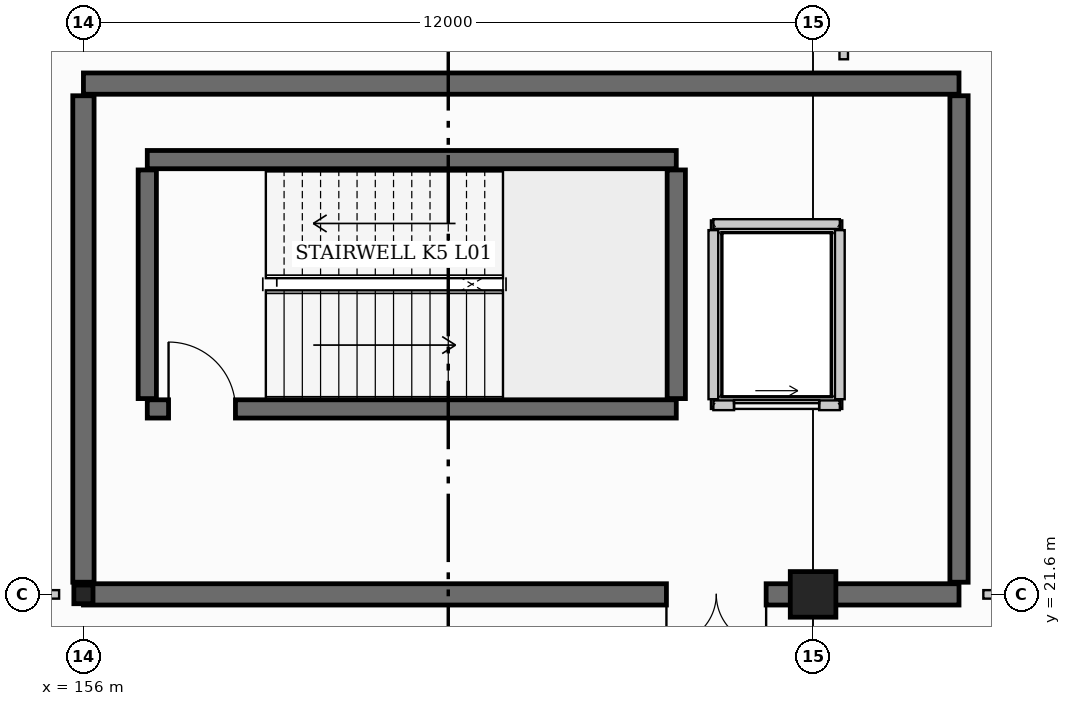
"""IFC4 building model, lengths in metres.
Left out: names, types, materials, properties, quantities, classifications, styles, units other than length and angle.
Written with IfcOpenShell. Run it as: python <this file> out.ifc"""

import sys

from ifc_helpers import new_model, si_unit, direction, frame, frame_2d, origin, origin_2d, place, context, subcontext, project, spatial, rectangle, i_section, extrude, element, fill, save


model = new_model("IFC4")
c1 = context("Model", 3, precision=1e-05, world=origin(), true_north=direction((0.0, 1.0)))
c2 = subcontext(c1, "Body", "Model", "MODEL_VIEW")
j1 = project(units=[si_unit("LENGTHUNIT", "METRE"), si_unit("PLANEANGLEUNIT", "RADIAN")], contexts=[c1])
p1 = place(None, origin())
s1 = spatial("IfcSite", under=j1, at=p1, CompositionType="ELEMENT")
p2 = place(p1, origin())
s2 = spatial("IfcBuilding", under=s1, at=p2, CompositionType="ELEMENT")
p3 = place(p2, frame((0.0, 0.0, 4.8)))
s3 = spatial("IfcBuildingStorey", under=s2, at=p3, CompositionType="ELEMENT", Elevation=4.8)
p4 = place(p3, frame((156.0, 21.6, 0.0), z_axis=(0.0, 0.0, 1.0), x_axis=(0.0, 1.0, 0.0)))
e1 = element("IfcColumn", 1, at=p4, inside=s3, PredefinedType="COLUMN", context=c2, shape_type="SweptSolid", body=[
    extrude(i_section(OverallWidth=0.307, OverallDepth=0.315, WebThickness=0.012, FlangeThickness=0.019, at=origin_2d()), origin(), (0.0, 0.0, 1.0), 4.8),
])
p5 = place(p3, frame((168.0, 21.6, 0.0), z_axis=(0.0, 0.0, 1.0), x_axis=(1.0, 0.0, 0.0)))
e2 = element("IfcColumn", 2, at=p5, inside=s3, PredefinedType="COLUMN", context=c2, shape_type="SweptSolid", body=[
    extrude(rectangle(XDim=0.75, YDim=0.75, at=origin_2d()), origin(), (0.0, 0.0, 1.0), 4.8),
])
p6 = place(p3, frame((156.0, 30.0, 0.0), z_axis=(0.0, 0.0, 1.0), x_axis=(1.0, 0.0, 0.0)))
e3 = element("IfcWall", 3, at=p6, inside=s3, PredefinedType="SHEAR", context=c2, shape_type="SweptSolid", body=[
    extrude(rectangle(XDim=14.4, YDim=0.35, at=frame_2d((7.2, 0.0))), origin(), (0.0, 0.0, 1.0), 4.8),
])
p7 = place(p3, frame((170.4, 21.6, 0.0), z_axis=(0.0, 0.0, 1.0), x_axis=(-1.0, 0.0, 0.0)))
e4 = element("IfcWall", 4, at=p7, inside=s3, PredefinedType="SHEAR", context=c2, shape_type="SweptSolid", body=[
    extrude(rectangle(XDim=14.4, YDim=0.35, at=frame_2d((7.2, 0.0))), origin(), (0.0, 0.0, 1.0), 4.8),
])
p8 = place(p7, frame((3.172, 0.0, 0.0)))
e5 = element("IfcOpeningElement", 5, at=p8, cuts=e4, PredefinedType="OPENING", context=c2, shape_type="SweptSolid", body=[
    extrude(rectangle(XDim=1.64, YDim=2.2, at=frame_2d((0.82, 1.1))), frame((0.0, 0.185, 0.0), z_axis=(0.0, -1.0, 0.0), x_axis=(1.0, 0.0, 0.0)), (0.0, 0.0, 1.0), 0.37),
])
p9 = place(p3, frame((156.0, 21.8, 0.0), z_axis=(0.0, 0.0, 1.0), x_axis=(0.0, 1.0, 0.0)))
e6 = element("IfcWall", 6, at=p9, inside=s3, PredefinedType="SHEAR", context=c2, shape_type="SweptSolid", body=[
    extrude(rectangle(XDim=8.0, YDim=0.35, at=frame_2d((4.0, 0.0))), origin(), (0.0, 0.0, 1.0), 4.8),
])
p10 = place(p3, frame((170.4, 29.8, 0.0), z_axis=(0.0, 0.0, 1.0), x_axis=(0.0, -1.0, 0.0)))
e7 = element("IfcWall", 7, at=p10, inside=s3, PredefinedType="SHEAR", context=c2, shape_type="SweptSolid", body=[
    extrude(rectangle(XDim=8.0, YDim=0.3, at=frame_2d((4.0, 0.0))), origin(), (0.0, 0.0, 1.0), 4.8),
])
p11 = place(p3, frame((157.05, 24.65, 0.0), z_axis=(0.0, 0.0, 1.0), x_axis=(1.0, 0.0, 0.0)))
e8 = element("IfcWall", 8, at=p11, inside=s3, PredefinedType="SHEAR", context=c2, shape_type="SweptSolid", body=[
    extrude(rectangle(XDim=8.7, YDim=0.3, at=frame_2d((4.35, 0.0))), origin(), (0.0, 0.0, 1.0), 4.8),
])
p12 = place(p11, frame((0.35, 0.0, 0.0)))
e9 = element("IfcOpeningElement", 9, at=p12, cuts=e8, PredefinedType="OPENING", context=c2, shape_type="SweptSolid", body=[
    extrude(rectangle(XDim=1.1, YDim=2.15, at=frame_2d((0.55, 1.075))), frame((0.0, 0.16, 0.0), z_axis=(0.0, -1.0, 0.0), x_axis=(1.0, 0.0, 0.0)), (0.0, 0.0, 1.0), 0.32),
])
p13 = place(p3, frame((165.75, 28.75, 0.0), z_axis=(0.0, 0.0, 1.0), x_axis=(-1.0, 0.0, 0.0)))
e10 = element("IfcWall", 10, at=p13, inside=s3, PredefinedType="SHEAR", context=c2, shape_type="SweptSolid", body=[
    extrude(rectangle(XDim=8.7, YDim=0.3, at=frame_2d((4.35, 0.0))), origin(), (0.0, 0.0, 1.0), 4.8),
])
for number, where, z_axis, x_axis in (
    (11, (157.05, 24.82, 0.0), (0.0, 0.0, 1.0), (0.0, 1.0, 0.0)),
    (12, (165.75, 24.82, 0.0), (0.0, 0.0, 1.0), (0.0, 1.0, 0.0)),
):
    element("IfcWall", number, at=place(p3, frame(where, z_axis=z_axis, x_axis=x_axis)), inside=s3, PredefinedType="SHEAR", context=c2, shape_type="SweptSolid", body=[
        extrude(rectangle(XDim=3.76, YDim=0.3, at=frame_2d((1.88, 0.0))), origin(), (0.0, 0.0, 1.0), 4.8),
    ])
p14 = place(p3, frame((166.36, 24.71, 0.0), z_axis=(0.0, 0.0, 1.0), x_axis=(1.0, 0.0, 0.0)))
e13 = element("IfcWall", 13, at=p14, inside=s3, PredefinedType="PARTITIONING", context=c2, shape_type="SweptSolid", body=[
    extrude(rectangle(XDim=2.08, YDim=0.16, at=frame_2d((1.04, 0.0))), origin(), (0.0, 0.0, 1.0), 4.43),
])
p15 = place(p14, frame((0.34, 0.0, 0.0)))
e14 = element("IfcOpeningElement", 14, at=p15, cuts=e13, PredefinedType="OPENING", context=c2, shape_type="SweptSolid", body=[
    extrude(rectangle(XDim=1.4, YDim=2.2, at=frame_2d((0.7, 1.1))), frame((0.0, 0.09, 0.0), z_axis=(0.0, -1.0, 0.0), x_axis=(1.0, 0.0, 0.0)), (0.0, 0.0, 1.0), 0.18),
])
p16 = place(p3, frame((168.44, 27.69, 0.0), z_axis=(0.0, 0.0, 1.0), x_axis=(-1.0, 0.0, 0.0)))
e15 = element("IfcWall", 15, at=p16, inside=s3, PredefinedType="PARTITIONING", context=c2, shape_type="SweptSolid", body=[
    extrude(rectangle(XDim=2.08, YDim=0.16, at=frame_2d((1.04, 0.0))), origin(), (0.0, 0.0, 1.0), 4.43),
])
for number, where, z_axis, x_axis in (
    (16, (166.36, 27.59, 0.0), (0.0, 0.0, 1.0), (0.0, -1.0, 0.0)),
    (17, (168.44, 24.81, 0.0), (0.0, 0.0, 1.0), (0.0, 1.0, 0.0)),
):
    element("IfcWall", number, at=place(p3, frame(where, z_axis=z_axis, x_axis=x_axis)), inside=s3, PredefinedType="PARTITIONING", context=c2, shape_type="SweptSolid", body=[
        extrude(rectangle(XDim=2.78, YDim=0.16, at=frame_2d((1.39, 0.0))), origin(), (0.0, 0.0, 1.0), 4.43),
    ])
p17 = place(p3, frame((144.3, 21.6, 0.0), z_axis=(0.0, 0.0, 1.0), x_axis=(1.0, 0.0, 0.0)))
e18 = element("IfcWall", 18, at=p17, inside=s3, PredefinedType="PARTITIONING", context=c2, shape_type="SweptSolid", body=[
    extrude(rectangle(XDim=11.3, YDim=0.14, at=frame_2d((5.65, 0.0))), origin(), (0.0, 0.0, 1.0), 3.53),
])
p18 = place(p17, frame((5.0, 0.0, 0.0)))
e19 = element("IfcOpeningElement", 19, at=p18, cuts=e18, PredefinedType="OPENING", context=c2, shape_type="SweptSolid", body=[
    extrude(rectangle(XDim=1.26, YDim=2.14, at=frame_2d((0.63, 1.07))), frame((0.0, 0.08, 0.0), z_axis=(0.0, -1.0, 0.0), x_axis=(1.0, 0.0, 0.0)), (0.0, 0.0, 1.0), 0.16),
])
p19 = place(p3, frame((168.504, 30.4, 0.0), z_axis=(0.0, 0.0, 1.0), x_axis=(0.0, 1.0, 0.0)))
e20 = element("IfcWall", 20, at=p19, inside=s3, PredefinedType="PARTITIONING", context=c2, shape_type="SweptSolid", body=[
    extrude(rectangle(XDim=14.9, YDim=0.14, at=frame_2d((7.45, 0.0))), origin(), (0.0, 0.0, 1.0), 3.823),
])
p20 = place(p3, frame((170.8, 21.6, 0.0), z_axis=(0.0, 0.0, 1.0), x_axis=(1.0, 0.0, 0.0)))
e21 = element("IfcWall", 21, at=p20, inside=s3, PredefinedType="PARTITIONING", context=c2, shape_type="SweptSolid", body=[
    extrude(rectangle(XDim=14.849, YDim=0.14, at=frame_2d((7.424, 0.0))), origin(), (0.0, 0.0, 1.0), 3.818),
])
p21 = place(p20, frame((6.774, 0.0, 0.0)))
e22 = element("IfcOpeningElement", 22, at=p21, cuts=e21, PredefinedType="OPENING", context=c2, shape_type="SweptSolid", body=[
    extrude(rectangle(XDim=1.2, YDim=2.12, at=frame_2d((0.6, 1.06))), frame((0.0, 0.08, 0.0), z_axis=(0.0, -1.0, 0.0), x_axis=(1.0, 0.0, 0.0)), (0.0, 0.0, 1.0), 0.16),
])
p22 = place(p15, origin())
e23 = element("IfcDoor", 23, at=p22, inside=s3, OperationType="SLIDING_TO_RIGHT", PredefinedType="DOOR", context=c2, shape_type="SweptSolid", body=[
    extrude(rectangle(XDim=1.4, YDim=2.2, at=frame_2d((0.7, 1.1))), frame((0.0, 0.025, 0.0), z_axis=(0.0, -1.0, 0.0), x_axis=(1.0, 0.0, 0.0)), (0.0, 0.0, 1.0), 0.05),
])
fill(e14, e23)
p23 = place(p12, origin())
e24 = element("IfcDoor", 24, at=p23, inside=s3, OperationType="SINGLE_SWING_LEFT", PredefinedType="DOOR", context=c2, shape_type="SweptSolid", body=[
    extrude(rectangle(XDim=1.1, YDim=2.15, at=frame_2d((0.55, 1.075))), frame((0.0, 0.025, 0.0), z_axis=(0.0, -1.0, 0.0), x_axis=(1.0, 0.0, 0.0)), (0.0, 0.0, 1.0), 0.05),
])
fill(e9, e24)
p24 = place(p8, origin())
e25 = element("IfcDoor", 25, at=p24, inside=s3, OperationType="DOUBLE_DOOR_SINGLE_SWING", PredefinedType="DOOR", context=c2, shape_type="SweptSolid", body=[
    extrude(rectangle(XDim=1.64, YDim=2.2, at=frame_2d((0.82, 1.1))), frame((0.0, 0.025, 0.0), z_axis=(0.0, -1.0, 0.0), x_axis=(1.0, 0.0, 0.0)), (0.0, 0.0, 1.0), 0.05),
])
fill(e5, e25)
save(model, sys.argv[1])
